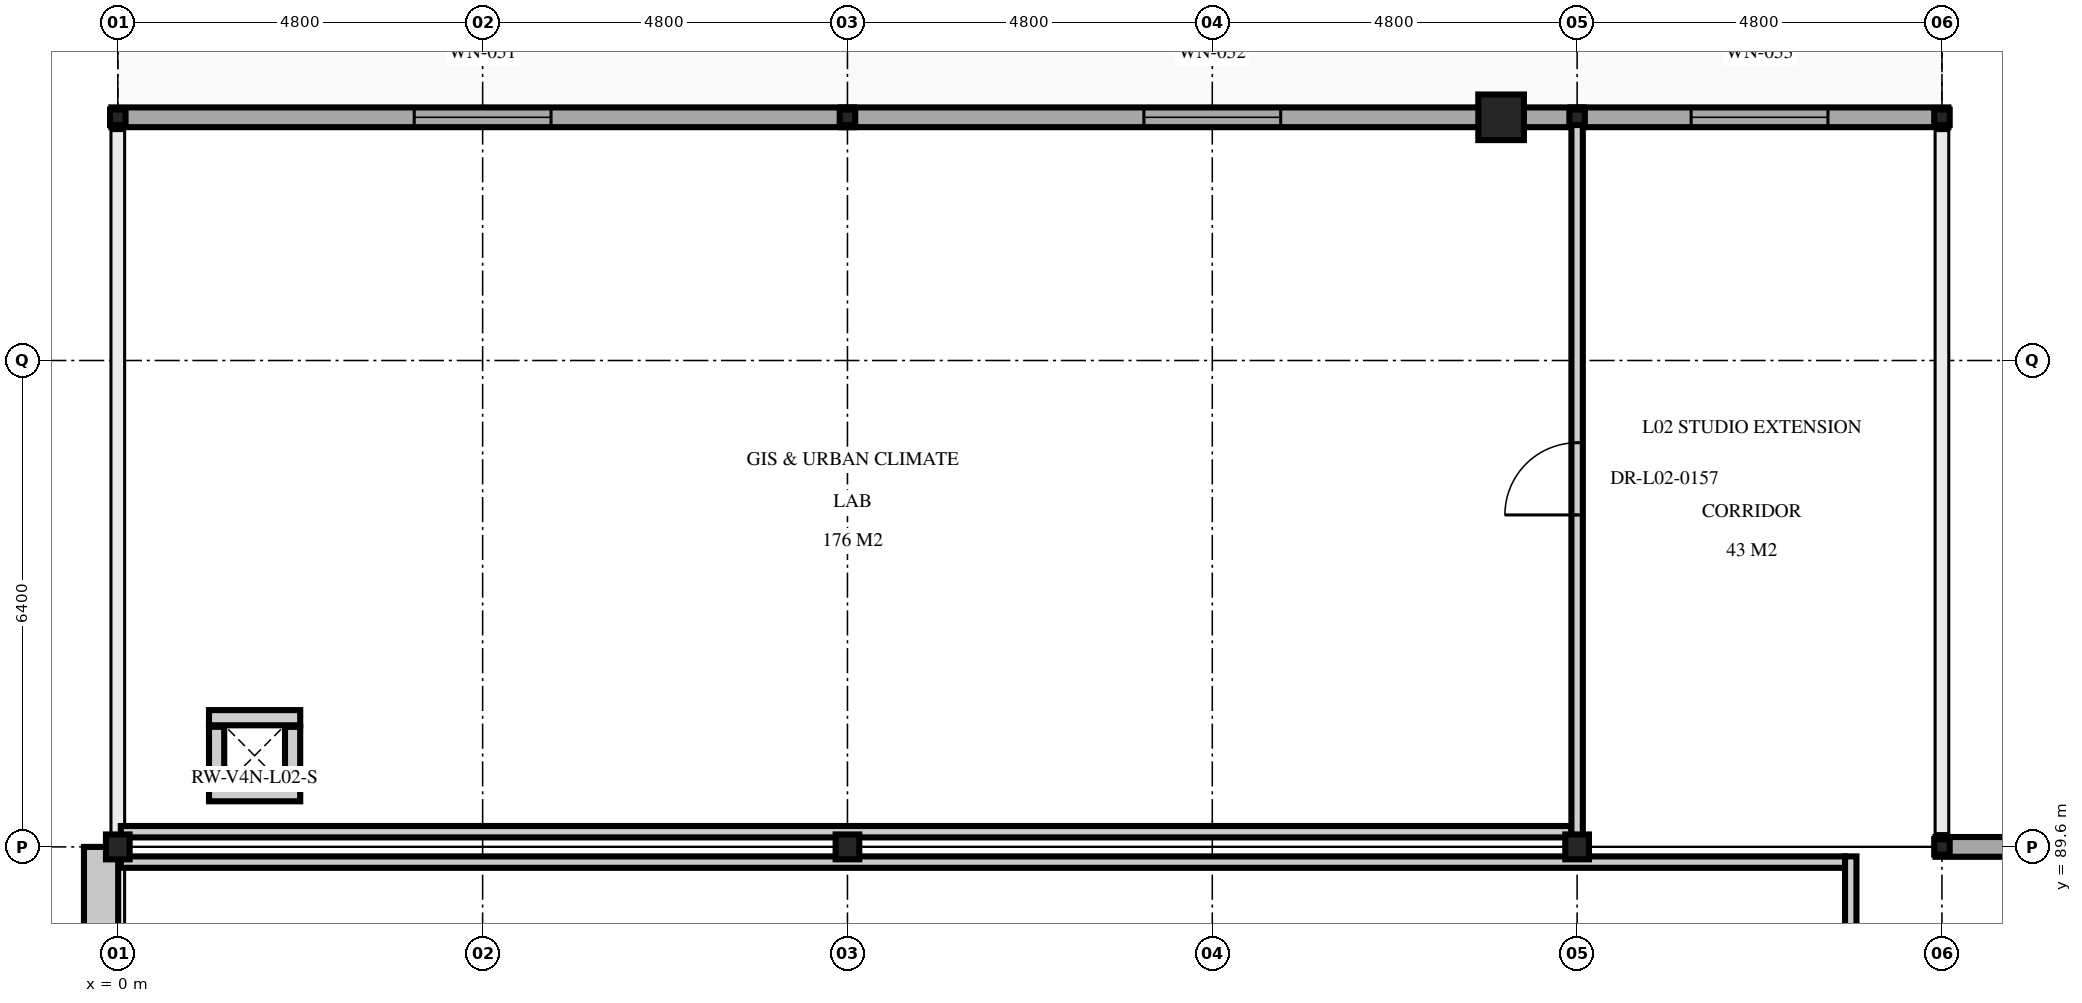
"""IFC4 building model, lengths in metres.
Left out: names, types, materials, properties, quantities, classifications, styles, units other than length and angle.
Written with IfcOpenShell. Run it as: python <this file> out.ifc"""

import sys

from ifc_helpers import new_model, si_unit, direction, frame, frame_2d, origin, origin_2d, place, context, subcontext, project, spatial, rectangle, i_section, extrude, element, fill, save


model = new_model("IFC4")
c1 = context("Model", 3, precision=1e-05, world=origin(), true_north=direction((0.0, 1.0)))
c2 = subcontext(c1, "Body", "Model", "MODEL_VIEW")
j1 = project(units=[si_unit("LENGTHUNIT", "METRE"), si_unit("PLANEANGLEUNIT", "RADIAN")], contexts=[c1])
p1 = place(None, origin())
s1 = spatial("IfcSite", under=j1, at=p1, CompositionType="ELEMENT")
p2 = place(p1, origin())
s2 = spatial("IfcBuilding", under=s1, at=p2, CompositionType="ELEMENT")
p3 = place(p2, frame((0.0, 0.0, 9.6)))
s3 = spatial("IfcBuildingStorey", under=s2, at=p3, CompositionType="ELEMENT", Elevation=9.6)
for number, where, z_axis, x_axis in (
    (1, (0.0, 89.6, 0.0), (0.0, 0.0, 1.0), (1.0, 0.0, 0.0)),
    (2, (9.6, 89.6, 0.0), (0.0, 0.0, 1.0), (1.0, 0.0, 0.0)),
    (3, (19.2, 89.6, 0.0), (0.0, 0.0, 1.0), (1.0, 0.0, 0.0)),
):
    element("IfcColumn", number, at=place(p3, frame(where, z_axis=z_axis, x_axis=x_axis)), inside=s3, PredefinedType="COLUMN", context=c2, shape_type="SweptSolid", body=[
        extrude(i_section(OverallWidth=0.311, OverallDepth=0.327, WebThickness=0.016, FlangeThickness=0.025, at=origin_2d()), origin(), (0.0, 0.0, 1.0), 4.5),
    ])
for number, where, z_axis, x_axis in (
    (4, (0.0, 99.2, 0.0), (0.0, 0.0, 1.0), (1.0, 0.0, 0.0)),
    (5, (9.6, 99.2, 0.0), (0.0, 0.0, 1.0), (1.0, 0.0, 0.0)),
    (6, (19.2, 99.2, 0.0), (0.0, 0.0, 1.0), (1.0, 0.0, 0.0)),
    (7, (24.0, 99.2, 0.0), (0.0, 0.0, 1.0), (1.0, 0.0, 0.0)),
    (8, (24.0, 89.6, 0.0), (0.0, 0.0, 1.0), (1.0, 0.0, 0.0)),
):
    element("IfcColumn", number, at=place(p3, frame(where, z_axis=z_axis, x_axis=x_axis)), inside=s3, PredefinedType="COLUMN", context=c2, shape_type="SweptSolid", body=[
        extrude(i_section(OverallWidth=0.204, OverallDepth=0.203, WebThickness=0.007, FlangeThickness=0.011, at=origin_2d()), origin(), (0.0, 0.0, 1.0), 4.28),
    ])
p4 = place(p3, frame((18.2, 99.2, 0.0), z_axis=(0.0, 0.0, 1.0), x_axis=(1.0, 0.0, 0.0)))
e9 = element("IfcColumn", 9, at=p4, inside=s3, PredefinedType="COLUMN", context=c2, shape_type="SweptSolid", body=[
    extrude(rectangle(XDim=0.6, YDim=0.6, at=origin_2d()), origin(), (0.0, 0.0, 1.0), 4.31),
])
for number, where, z_axis, x_axis in (
    (10, (2.4, 90.3, 0.0), (0.0, 0.0, 1.0), (-1.0, 0.0, 0.0)),
    (11, (1.2, 91.3, 0.0), (0.0, 0.0, 1.0), (1.0, 0.0, 0.0)),
):
    element("IfcWall", number, at=place(p3, frame(where, z_axis=z_axis, x_axis=x_axis)), inside=s3, PredefinedType="PARTITIONING", context=c2, shape_type="SweptSolid", body=[
        extrude(rectangle(XDim=1.2, YDim=0.2, at=frame_2d((0.6, 0.0))), origin(), (0.0, 0.0, 1.0), 3.755),
    ])
for number, where, z_axis, x_axis in (
    (12, (1.3, 90.42, 0.0), (0.0, 0.0, 1.0), (0.0, 1.0, 0.0)),
    (13, (2.3, 91.18, 0.0), (0.0, 0.0, 1.0), (0.0, -1.0, 0.0)),
):
    element("IfcWall", number, at=place(p3, frame(where, z_axis=z_axis, x_axis=x_axis)), inside=s3, PredefinedType="PARTITIONING", context=c2, shape_type="SweptSolid", body=[
        extrude(rectangle(XDim=0.76, YDim=0.2, at=frame_2d((0.38, 0.0))), origin(), (0.0, 0.0, 1.0), 3.755),
    ])
p5 = place(p3, frame((23.915, 89.6, 0.0), z_axis=(0.0, 0.0, 1.0), x_axis=(1.0, 0.0, 0.0)))
e14 = element("IfcWall", 14, at=p5, inside=s3, PredefinedType="SOLIDWALL", context=c2, shape_type="SweptSolid", body=[
    extrude(rectangle(XDim=4.97, YDim=0.26, at=frame_2d((2.485, 0.0))), origin(), (0.0, 0.0, 1.0), 3.735),
])
p6 = place(p3, frame((-0.085, 99.2, 0.0), z_axis=(0.0, 0.0, 1.0), x_axis=(1.0, 0.0, 0.0)))
e15 = element("IfcWall", 15, at=p6, inside=s3, PredefinedType="SOLIDWALL", context=c2, shape_type="SweptSolid", body=[
    extrude(rectangle(XDim=9.77, YDim=0.26, at=frame_2d((4.885, 0.0))), origin(), (0.0, 0.0, 1.0), 3.879),
])
p7 = place(p6, frame((3.985, 0.0, 1.0)))
e16 = element("IfcOpeningElement", 16, at=p7, cuts=e15, PredefinedType="OPENING", context=c2, shape_type="SweptSolid", body=[
    extrude(rectangle(XDim=1.8, YDim=2.1, at=frame_2d((0.9, 1.05))), frame((0.0, 0.14, 0.0), z_axis=(0.0, -1.0, 0.0), x_axis=(1.0, 0.0, 0.0)), (0.0, 0.0, 1.0), 0.28),
])
p8 = place(p3, frame((9.515, 99.2, 0.0), z_axis=(0.0, 0.0, 1.0), x_axis=(1.0, 0.0, 0.0)))
e17 = element("IfcWall", 17, at=p8, inside=s3, PredefinedType="SOLIDWALL", context=c2, shape_type="SweptSolid", body=[
    extrude(rectangle(XDim=9.77, YDim=0.26, at=frame_2d((4.885, 0.0))), origin(), (0.0, 0.0, 1.0), 3.845),
])
p9 = place(p8, frame((3.985, 0.0, 1.0)))
e18 = element("IfcOpeningElement", 18, at=p9, cuts=e17, PredefinedType="OPENING", context=c2, shape_type="SweptSolid", body=[
    extrude(rectangle(XDim=1.8, YDim=2.1, at=frame_2d((0.9, 1.05))), frame((0.0, 0.14, 0.0), z_axis=(0.0, -1.0, 0.0), x_axis=(1.0, 0.0, 0.0)), (0.0, 0.0, 1.0), 0.28),
])
p10 = place(p3, frame((19.115, 99.2, 0.0), z_axis=(0.0, 0.0, 1.0), x_axis=(1.0, 0.0, 0.0)))
e19 = element("IfcWall", 19, at=p10, inside=s3, PredefinedType="SOLIDWALL", context=c2, shape_type="SweptSolid", body=[
    extrude(rectangle(XDim=4.97, YDim=0.26, at=frame_2d((2.485, 0.0))), origin(), (0.0, 0.0, 1.0), 3.845),
])
p11 = place(p10, frame((1.585, 0.0, 1.0)))
e20 = element("IfcOpeningElement", 20, at=p11, cuts=e19, PredefinedType="OPENING", context=c2, shape_type="SweptSolid", body=[
    extrude(rectangle(XDim=1.8, YDim=2.1, at=frame_2d((0.9, 1.05))), frame((0.0, 0.14, 0.0), z_axis=(0.0, -1.0, 0.0), x_axis=(1.0, 0.0, 0.0)), (0.0, 0.0, 1.0), 0.28),
])
p12 = place(p3, frame((0.04, 89.4, 0.0), z_axis=(0.0, 0.0, 1.0), x_axis=(1.0, 0.0, 0.0)))
e21 = element("IfcWall", 21, at=p12, inside=s3, PredefinedType="PARTITIONING", context=c2, shape_type="SweptSolid", body=[
    extrude(rectangle(XDim=22.685, YDim=0.15, at=frame_2d((11.343, 0.0))), origin(), (0.0, 0.0, 1.0), 3.735),
])
p13 = place(p3, frame((22.8, 76.8, 0.0), z_axis=(0.0, 0.0, 1.0), x_axis=(0.0, 1.0, 0.0)))
e22 = element("IfcWall", 22, at=p13, inside=s3, PredefinedType="PARTITIONING", context=c2, shape_type="SweptSolid", body=[
    extrude(rectangle(XDim=12.675, YDim=0.15, at=frame_2d((6.337, 0.0))), origin(), (0.0, 0.0, 1.0), 3.735),
])
p14 = place(p13, frame((5.862, 0.0, 0.0)))
e23 = element("IfcOpeningElement", 23, at=p14, cuts=e22, PredefinedType="OPENING", context=c2, shape_type="SweptSolid", body=[
    extrude(rectangle(XDim=0.95, YDim=2.15, at=frame_2d((0.475, 1.075))), frame((0.0, 0.085, 0.0), z_axis=(0.0, -1.0, 0.0), x_axis=(1.0, 0.0, 0.0)), (0.0, 0.0, 1.0), 0.17),
])
p15 = place(p3, frame((0.04, 89.8, 0.0), z_axis=(0.0, 0.0, 1.0), x_axis=(1.0, 0.0, 0.0)))
e24 = element("IfcWall", 24, at=p15, inside=s3, PredefinedType="PARTITIONING", context=c2, shape_type="SweptSolid", body=[
    extrude(rectangle(XDim=19.085, YDim=0.15, at=frame_2d((9.542, 0.0))), origin(), (0.0, 0.0, 1.0), 3.735),
])
p16 = place(p3, frame((19.2, 89.725, 0.0), z_axis=(0.0, 0.0, 1.0), x_axis=(0.0, 1.0, 0.0)))
e25 = element("IfcWall", 25, at=p16, inside=s3, PredefinedType="PARTITIONING", context=c2, shape_type="SweptSolid", body=[
    extrude(rectangle(XDim=9.435, YDim=0.15, at=frame_2d((4.717, 0.0))), origin(), (0.0, 0.0, 1.0), 3.735),
])
p17 = place(p16, frame((4.243, 0.0, 0.0)))
e26 = element("IfcOpeningElement", 26, at=p17, cuts=e25, PredefinedType="OPENING", context=c2, shape_type="SweptSolid", body=[
    extrude(rectangle(XDim=0.95, YDim=2.15, at=frame_2d((0.475, 1.075))), frame((0.0, 0.085, 0.0), z_axis=(0.0, -1.0, 0.0), x_axis=(1.0, 0.0, 0.0)), (0.0, 0.0, 1.0), 0.17),
])
p18 = place(p7, origin())
e27 = element("IfcWindow", 27, at=p18, inside=s3, PartitioningType="SINGLE_PANEL", PredefinedType="WINDOW", context=c2, shape_type="SweptSolid", body=[
    extrude(rectangle(XDim=1.8, YDim=2.1, at=frame_2d((0.9, 1.05))), frame((0.0, 0.03, 0.0), z_axis=(0.0, -1.0, 0.0), x_axis=(1.0, 0.0, 0.0)), (0.0, 0.0, 1.0), 0.06),
])
fill(e16, e27)
p19 = place(p9, origin())
e28 = element("IfcWindow", 28, at=p19, inside=s3, PartitioningType="SINGLE_PANEL", PredefinedType="WINDOW", context=c2, shape_type="SweptSolid", body=[
    extrude(rectangle(XDim=1.8, YDim=2.1, at=frame_2d((0.9, 1.05))), frame((0.0, 0.03, 0.0), z_axis=(0.0, -1.0, 0.0), x_axis=(1.0, 0.0, 0.0)), (0.0, 0.0, 1.0), 0.06),
])
fill(e18, e28)
p20 = place(p11, origin())
e29 = element("IfcWindow", 29, at=p20, inside=s3, PartitioningType="SINGLE_PANEL", PredefinedType="WINDOW", context=c2, shape_type="SweptSolid", body=[
    extrude(rectangle(XDim=1.8, YDim=2.1, at=frame_2d((0.9, 1.05))), frame((0.0, 0.03, 0.0), z_axis=(0.0, -1.0, 0.0), x_axis=(1.0, 0.0, 0.0)), (0.0, 0.0, 1.0), 0.06),
])
fill(e20, e29)
p21 = place(p17, origin())
e30 = element("IfcDoor", 30, at=p21, inside=s3, OperationType="SINGLE_SWING_LEFT", PredefinedType="DOOR", context=c2, shape_type="SweptSolid", body=[
    extrude(rectangle(XDim=0.95, YDim=2.15, at=frame_2d((0.475, 1.075))), frame((0.0, 0.025, 0.0), z_axis=(0.0, -1.0, 0.0), x_axis=(1.0, 0.0, 0.0)), (0.0, 0.0, 1.0), 0.05),
])
fill(e26, e30)
save(model, sys.argv[1])
